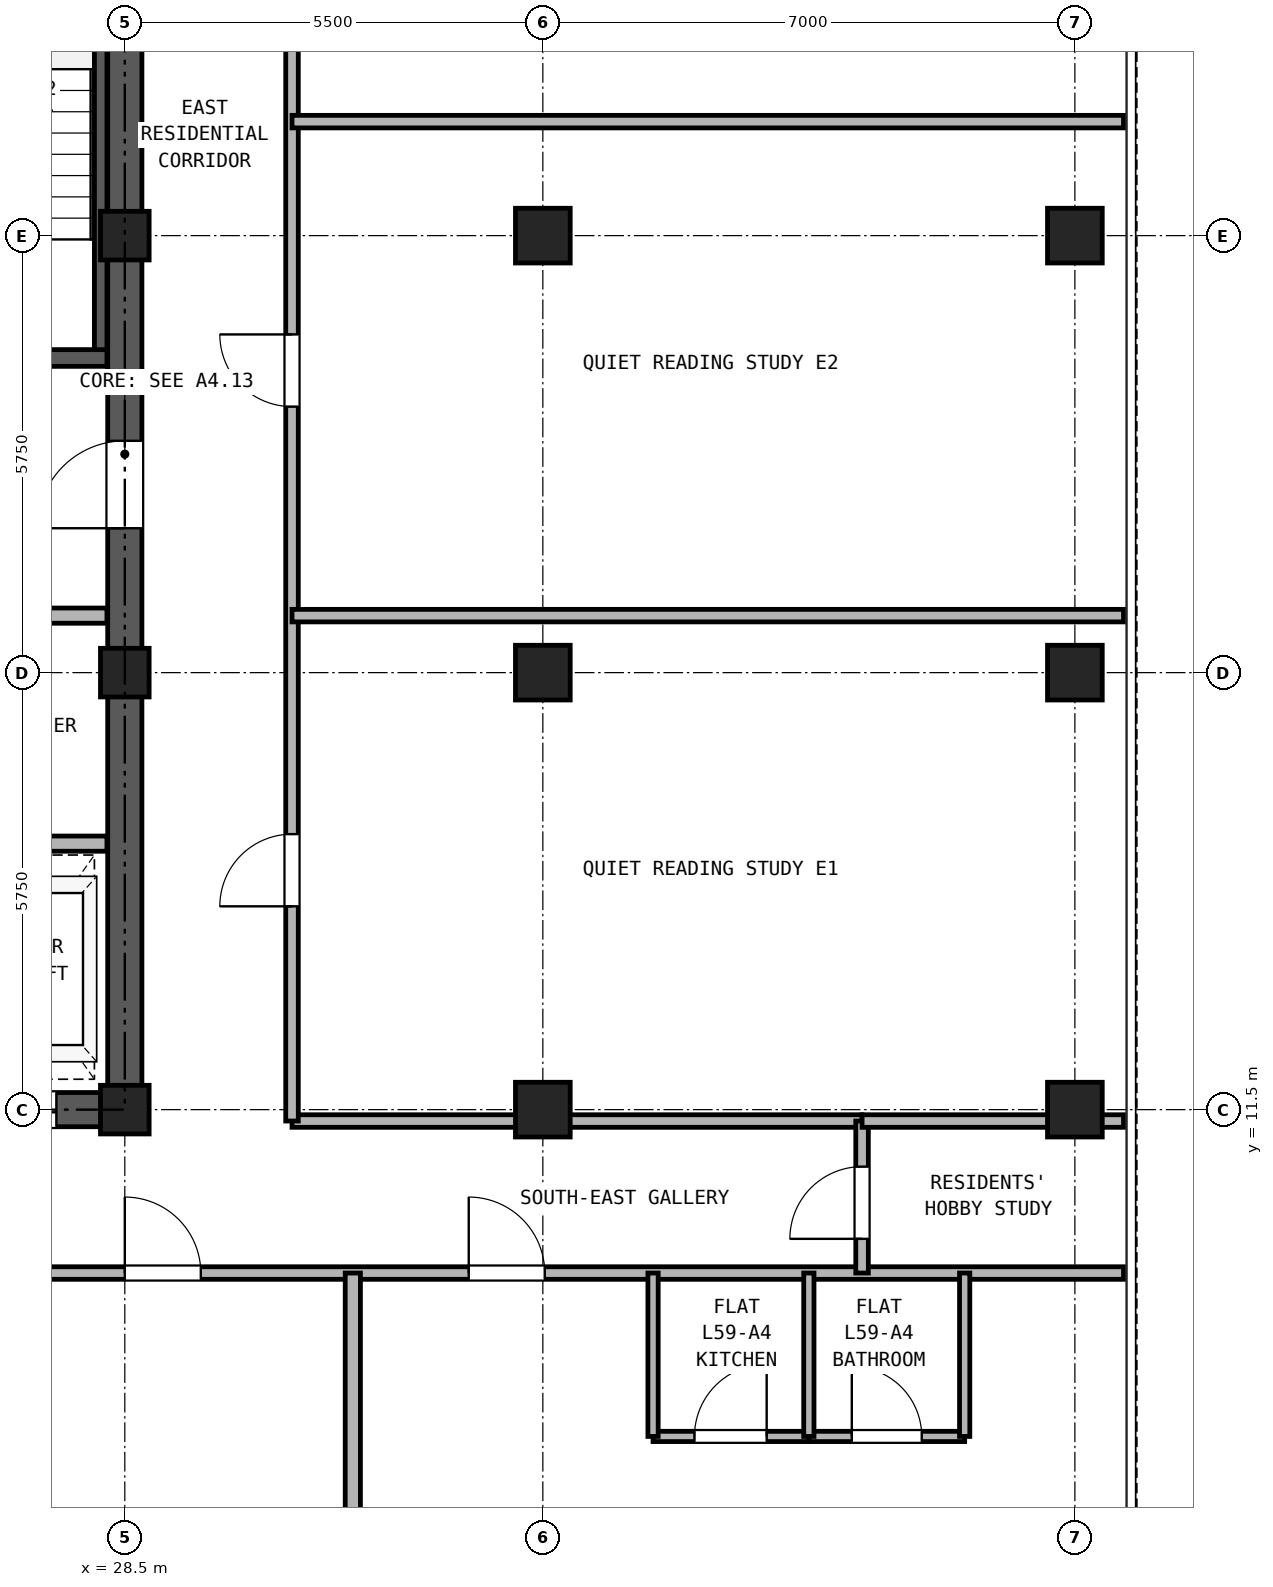
"""IFC4 building model, lengths in metres.
Left out: names, types, materials, properties, quantities, classifications, styles, units other than length and angle.
Written with IfcOpenShell. Run it as: python <this file> out.ifc"""

import sys

from ifc_helpers import new_model, si_unit, direction, frame, frame_2d, origin, origin_2d, place, context, subcontext, project, spatial, rectangle, hollow_rectangle, extrude, source, transform, mapped, element, fill, save


model = new_model("IFC4")
c1 = context("Model", 3, precision=1e-05, world=origin(), true_north=direction((0.0, 1.0)))
c2 = subcontext(c1, "Body", "Model", "MODEL_VIEW")
j1 = project(units=[si_unit("LENGTHUNIT", "METRE"), si_unit("PLANEANGLEUNIT", "RADIAN")], contexts=[c1])
p1 = place(None, origin())
s1 = spatial("IfcSite", under=j1, at=p1, CompositionType="ELEMENT")
p2 = place(p1, origin())
s2 = spatial("IfcBuilding", under=s1, at=p2, CompositionType="ELEMENT")
p3 = place(p2, frame((0.0, 0.0, 209.2)))
s3 = spatial("IfcBuildingStorey", under=s2, at=p3, CompositionType="ELEMENT", Elevation=209.2)
m1 = source(origin(), c2, "Body", "SweptSolid", [
    extrude(hollow_rectangle(XDim=0.72, YDim=0.72, WallThickness=0.04, at=origin_2d()), origin(), (0.0, 0.0, 1.0), 2.95),
])
for number, where, z_axis, x_axis in (
    (1, (41.0, 11.5, 0.0), (0.0, 0.0, 1.0), (1.0, 0.0, 0.0)),
    (2, (41.0, 17.25, 0.0), (0.0, 0.0, 1.0), (1.0, 0.0, 0.0)),
    (3, (41.0, 23.0, 0.0), (0.0, 0.0, 1.0), (1.0, 0.0, 0.0)),
):
    element("IfcColumn", number, at=place(p3, frame(where, z_axis=z_axis, x_axis=x_axis)), inside=s3, PredefinedType="COLUMN", context=c2, shape_type="MappedRepresentation", body=[
        mapped(m1, transform((0.0, 0.0, 0.0), x_axis=(1.0, 0.0, 0.0), y_axis=(0.0, 1.0, 0.0), z_axis=(0.0, 0.0, 1.0), scale=1.0)),
    ])
m2 = source(origin(), c2, "Body", "SweptSolid", [
    extrude(hollow_rectangle(XDim=0.64, YDim=0.64, WallThickness=0.035, at=origin_2d()), origin(), (0.0, 0.0, 1.0), 2.95),
])
for number, where, z_axis, x_axis in (
    (4, (28.5, 11.5, 0.0), (0.0, 0.0, 1.0), (1.0, 0.0, 0.0)),
    (5, (28.5, 17.25, 0.0), (0.0, 0.0, 1.0), (1.0, 0.0, 0.0)),
    (6, (28.5, 23.0, 0.0), (0.0, 0.0, 1.0), (1.0, 0.0, 0.0)),
):
    element("IfcColumn", number, at=place(p3, frame(where, z_axis=z_axis, x_axis=x_axis)), inside=s3, PredefinedType="COLUMN", context=c2, shape_type="MappedRepresentation", body=[
        mapped(m2, transform((0.0, 0.0, 0.0), x_axis=(1.0, 0.0, 0.0), y_axis=(0.0, 1.0, 0.0), z_axis=(0.0, 0.0, 1.0), scale=1.0)),
    ])
for number, where, z_axis, x_axis in (
    (7, (34.0, 11.5, 0.0), (0.0, 0.0, 1.0), (1.0, 0.0, 0.0)),
    (8, (34.0, 17.25, 0.0), (0.0, 0.0, 1.0), (1.0, 0.0, 0.0)),
    (9, (34.0, 23.0, 0.0), (0.0, 0.0, 1.0), (1.0, 0.0, 0.0)),
):
    element("IfcColumn", number, at=place(p3, frame(where, z_axis=z_axis, x_axis=x_axis)), inside=s3, PredefinedType="COLUMN", context=c2, shape_type="MappedRepresentation", body=[
        mapped(m1, transform((0.0, 0.0, 0.0), x_axis=(1.0, 0.0, 0.0), y_axis=(0.0, 1.0, 0.0), z_axis=(0.0, 0.0, 1.0), scale=1.0)),
    ])
p4 = place(p3, frame((18.275, 11.5, 0.0), z_axis=(0.0, 0.0, 1.0), x_axis=(1.0, 0.0, 0.0)))
e10 = element("IfcWall", 10, at=p4, inside=s3, PredefinedType="SHEAR", context=c2, shape_type="SweptSolid", body=[
    extrude(rectangle(XDim=10.45, YDim=0.45, at=frame_2d((5.225, 0.0))), origin(), (0.0, 0.0, 1.0), 2.95),
])
p5 = place(p4, frame((1.825, 0.0, 0.0)))
e11 = element("IfcOpeningElement", 11, at=p5, cuts=e10, PredefinedType="OPENING", context=c2, shape_type="SweptSolid", body=[
    extrude(rectangle(XDim=0.95, YDim=2.15, at=frame_2d((0.475, 1.075))), frame((0.0, 0.235, 0.0), z_axis=(0.0, -1.0, 0.0), x_axis=(1.0, 0.0, 0.0)), (0.0, 0.0, 1.0), 0.47),
])
p6 = place(p4, frame((5.325, 0.0, 0.0)))
e12 = element("IfcOpeningElement", 12, at=p6, cuts=e10, PredefinedType="OPENING", context=c2, shape_type="SweptSolid", body=[
    extrude(rectangle(XDim=0.95, YDim=2.15, at=frame_2d((0.475, 1.075))), frame((0.0, 0.235, 0.0), z_axis=(0.0, -1.0, 0.0), x_axis=(1.0, 0.0, 0.0)), (0.0, 0.0, 1.0), 0.47),
])
p7 = place(p4, frame((8.225, 0.0, 0.0)))
e13 = element("IfcOpeningElement", 13, at=p7, cuts=e10, PredefinedType="OPENING", context=c2, shape_type="SweptSolid", body=[
    extrude(rectangle(XDim=1.1, YDim=2.25, at=frame_2d((0.55, 1.125))), frame((0.0, 0.235, 0.0), z_axis=(0.0, -1.0, 0.0), x_axis=(1.0, 0.0, 0.0)), (0.0, 0.0, 1.0), 0.47),
])
p8 = place(p3, frame((28.5, 11.725, 0.0), z_axis=(0.0, 0.0, 1.0), x_axis=(0.0, 1.0, 0.0)))
e14 = element("IfcWall", 14, at=p8, inside=s3, PredefinedType="SHEAR", context=c2, shape_type="SweptSolid", body=[
    extrude(rectangle(XDim=16.8, YDim=0.45, at=frame_2d((8.4, 0.0))), origin(), (0.0, 0.0, 1.0), 2.95),
])
p9 = place(p8, frame((7.425, 0.0, 0.0)))
e15 = element("IfcOpeningElement", 15, at=p9, cuts=e14, PredefinedType="OPENING", context=c2, shape_type="SweptSolid", body=[
    extrude(rectangle(XDim=1.15, YDim=2.2, at=frame_2d((0.575, 1.1))), frame((0.0, 0.235, 0.0), z_axis=(0.0, -1.0, 0.0), x_axis=(1.0, 0.0, 0.0)), (0.0, 0.0, 1.0), 0.47),
])
p10 = place(p3, frame((28.183, 21.39, 0.0), z_axis=(0.0, 0.0, 1.0), x_axis=(0.0, 1.0, 0.0)))
e16 = element("IfcWall", 16, at=p10, inside=s3, PredefinedType="PARTITIONING", context=c2, shape_type="SweptSolid", body=[
    extrude(rectangle(XDim=6.945, YDim=0.165, at=frame_2d((3.473, 0.0))), origin(), (0.0, 0.0, 1.0), 2.95),
])
p11 = place(p3, frame((25.13, 21.39, 0.0), z_axis=(0.0, 0.0, 1.0), x_axis=(1.0, 0.0, 0.0)))
e17 = element("IfcWall", 17, at=p11, inside=s3, PredefinedType="SOLIDWALL", context=c2, shape_type="SweptSolid", body=[
    extrude(rectangle(XDim=3.135, YDim=0.22, at=frame_2d((1.567, 0.0))), origin(), (0.0, 0.0, 1.0), 2.95),
])
p12 = place(p11, frame((0.92, 0.0, 0.0)))
e18 = element("IfcOpeningElement", 18, at=p12, cuts=e17, PredefinedType="OPENING", context=c2, shape_type="SweptSolid", body=[
    extrude(rectangle(XDim=1.15, YDim=2.2, at=frame_2d((0.575, 1.1))), frame((0.0, 0.12, 0.0), z_axis=(0.0, -1.0, 0.0), x_axis=(1.0, 0.0, 0.0)), (0.0, 0.0, 1.0), 0.24),
])
p13 = place(p3, frame((18.735, 18.0, 0.0), z_axis=(0.0, 0.0, 1.0), x_axis=(1.0, 0.0, 0.0)))
e19 = element("IfcWall", 19, at=p13, inside=s3, PredefinedType="PARTITIONING", context=c2, shape_type="SweptSolid", body=[
    extrude(rectangle(XDim=9.53, YDim=0.2, at=frame_2d((4.765, 0.0))), origin(), (0.0, 0.0, 1.0), 2.95),
])
p14 = place(p13, frame((0.515, 0.0, 0.0)))
e20 = element("IfcOpeningElement", 20, at=p14, cuts=e19, PredefinedType="OPENING", context=c2, shape_type="SweptSolid", body=[
    extrude(rectangle(XDim=1.3, YDim=2.3, at=frame_2d((0.65, 1.15))), frame((0.0, 0.11, 0.0), z_axis=(0.0, -1.0, 0.0), x_axis=(1.0, 0.0, 0.0)), (0.0, 0.0, 1.0), 0.22),
])
p15 = place(p13, frame((2.615, 0.0, 0.0)))
e21 = element("IfcOpeningElement", 21, at=p15, cuts=e19, PredefinedType="OPENING", context=c2, shape_type="SweptSolid", body=[
    extrude(rectangle(XDim=1.3, YDim=2.3, at=frame_2d((0.65, 1.15))), frame((0.0, 0.11, 0.0), z_axis=(0.0, -1.0, 0.0), x_axis=(1.0, 0.0, 0.0)), (0.0, 0.0, 1.0), 0.22),
])
p16 = place(p13, frame((5.015, 0.0, 0.0)))
e22 = element("IfcOpeningElement", 22, at=p16, cuts=e19, PredefinedType="OPENING", context=c2, shape_type="SweptSolid", body=[
    extrude(rectangle(XDim=0.9, YDim=2.05, at=frame_2d((0.45, 1.025))), frame((0.0, 0.11, 0.0), z_axis=(0.0, -1.0, 0.0), x_axis=(1.0, 0.0, 0.0)), (0.0, 0.0, 1.0), 0.22),
])
p17 = place(p13, frame((7.715, 0.0, 0.0)))
e23 = element("IfcOpeningElement", 23, at=p17, cuts=e19, PredefinedType="OPENING", context=c2, shape_type="SweptSolid", body=[
    extrude(rectangle(XDim=0.9, YDim=2.05, at=frame_2d((0.45, 1.025))), frame((0.0, 0.11, 0.0), z_axis=(0.0, -1.0, 0.0), x_axis=(1.0, 0.0, 0.0)), (0.0, 0.0, 1.0), 0.22),
])
p18 = place(p3, frame((18.735, 15.0, 0.0), z_axis=(0.0, 0.0, 1.0), x_axis=(1.0, 0.0, 0.0)))
e24 = element("IfcWall", 24, at=p18, inside=s3, PredefinedType="PARTITIONING", context=c2, shape_type="SweptSolid", body=[
    extrude(rectangle(XDim=9.53, YDim=0.2, at=frame_2d((4.765, 0.0))), origin(), (0.0, 0.0, 1.0), 2.95),
])
p19 = place(p3, frame((0.16, 9.35, 0.0), z_axis=(0.0, 0.0, 1.0), x_axis=(1.0, 0.0, 0.0)))
e25 = element("IfcWall", 25, at=p19, inside=s3, PredefinedType="PARTITIONING", context=c2, shape_type="SweptSolid", body=[
    extrude(rectangle(XDim=41.48, YDim=0.165, at=frame_2d((20.74, 0.0))), origin(), (0.0, 0.0, 1.0), 2.95),
])
p20 = place(p19, frame((9.64, 0.0, 0.0)))
e26 = element("IfcOpeningElement", 26, at=p20, cuts=e25, PredefinedType="OPENING", context=c2, shape_type="SweptSolid", body=[
    extrude(rectangle(XDim=1.0, YDim=2.15, at=frame_2d((0.5, 1.075))), frame((0.0, 0.093, 0.0), z_axis=(0.0, -1.0, 0.0), x_axis=(1.0, 0.0, 0.0)), (0.0, 0.0, 1.0), 0.185),
])
p21 = place(p19, frame((19.09, 0.0, 0.0)))
e27 = element("IfcOpeningElement", 27, at=p21, cuts=e25, PredefinedType="OPENING", context=c2, shape_type="SweptSolid", body=[
    extrude(rectangle(XDim=1.0, YDim=2.15, at=frame_2d((0.5, 1.075))), frame((0.0, 0.093, 0.0), z_axis=(0.0, -1.0, 0.0), x_axis=(1.0, 0.0, 0.0)), (0.0, 0.0, 1.0), 0.185),
])
p22 = place(p19, frame((28.34, 0.0, 0.0)))
e28 = element("IfcOpeningElement", 28, at=p22, cuts=e25, PredefinedType="OPENING", context=c2, shape_type="SweptSolid", body=[
    extrude(rectangle(XDim=1.0, YDim=2.15, at=frame_2d((0.5, 1.075))), frame((0.0, 0.093, 0.0), z_axis=(0.0, -1.0, 0.0), x_axis=(1.0, 0.0, 0.0)), (0.0, 0.0, 1.0), 0.185),
])
p23 = place(p19, frame((32.865, 0.0, 0.0)))
e29 = element("IfcOpeningElement", 29, at=p23, cuts=e25, PredefinedType="OPENING", context=c2, shape_type="SweptSolid", body=[
    extrude(rectangle(XDim=1.0, YDim=2.15, at=frame_2d((0.5, 1.075))), frame((0.0, 0.093, 0.0), z_axis=(0.0, -1.0, 0.0), x_axis=(1.0, 0.0, 0.0)), (0.0, 0.0, 1.0), 0.185),
])
p24 = place(p3, frame((30.7, 11.35, 0.0), z_axis=(0.0, 0.0, 1.0), x_axis=(1.0, 0.0, 0.0)))
e30 = element("IfcWall", 30, at=p24, inside=s3, PredefinedType="PARTITIONING", context=c2, shape_type="SweptSolid", body=[
    extrude(rectangle(XDim=7.5, YDim=0.165, at=frame_2d((3.75, 0.0))), origin(), (0.0, 0.0, 1.0), 2.323),
])
p25 = place(p3, frame((38.2, 9.35, 0.0), z_axis=(0.0, 0.0, 1.0), x_axis=(0.0, 1.0, 0.0)))
e31 = element("IfcWall", 31, at=p25, inside=s3, PredefinedType="PARTITIONING", context=c2, shape_type="SweptSolid", body=[
    extrude(rectangle(XDim=2.0, YDim=0.165, at=frame_2d((1.0, 0.0))), origin(), (0.0, 0.0, 1.0), 2.95),
])
p26 = place(p25, frame((0.45, 0.0, 0.0)))
e32 = element("IfcOpeningElement", 32, at=p26, cuts=e31, PredefinedType="OPENING", context=c2, shape_type="SweptSolid", body=[
    extrude(rectangle(XDim=0.95, YDim=2.15, at=frame_2d((0.475, 1.075))), frame((0.0, 0.093, 0.0), z_axis=(0.0, -1.0, 0.0), x_axis=(1.0, 0.0, 0.0)), (0.0, 0.0, 1.0), 0.185),
])
p27 = place(p3, frame((30.7, 11.35, 0.0), z_axis=(0.0, 0.0, 1.0), x_axis=(0.0, 1.0, 0.0)))
e33 = element("IfcWall", 33, at=p27, inside=s3, PredefinedType="PARTITIONING", context=c2, shape_type="SweptSolid", body=[
    extrude(rectangle(XDim=23.79, YDim=0.165, at=frame_2d((11.895, 0.0))), origin(), (0.0, 0.0, 1.0), 2.95),
])
p28 = place(p27, frame((2.825, 0.0, 0.0)))
e34 = element("IfcOpeningElement", 34, at=p28, cuts=e33, PredefinedType="OPENING", context=c2, shape_type="SweptSolid", body=[
    extrude(rectangle(XDim=0.95, YDim=2.15, at=frame_2d((0.475, 1.075))), frame((0.0, 0.093, 0.0), z_axis=(0.0, -1.0, 0.0), x_axis=(1.0, 0.0, 0.0)), (0.0, 0.0, 1.0), 0.185),
])
p29 = place(p27, frame((9.4, 0.0, 0.0)))
e35 = element("IfcOpeningElement", 35, at=p29, cuts=e33, PredefinedType="OPENING", context=c2, shape_type="SweptSolid", body=[
    extrude(rectangle(XDim=0.95, YDim=2.15, at=frame_2d((0.475, 1.075))), frame((0.0, 0.093, 0.0), z_axis=(0.0, -1.0, 0.0), x_axis=(1.0, 0.0, 0.0)), (0.0, 0.0, 1.0), 0.185),
])
p30 = place(p27, frame((15.5, 0.0, 0.0)))
e36 = element("IfcOpeningElement", 36, at=p30, cuts=e33, PredefinedType="OPENING", context=c2, shape_type="SweptSolid", body=[
    extrude(rectangle(XDim=0.95, YDim=2.15, at=frame_2d((0.475, 1.075))), frame((0.0, 0.093, 0.0), z_axis=(0.0, -1.0, 0.0), x_axis=(1.0, 0.0, 0.0)), (0.0, 0.0, 1.0), 0.185),
])
p31 = place(p27, frame((20.82, 0.0, 0.0)))
e37 = element("IfcOpeningElement", 37, at=p31, cuts=e33, PredefinedType="OPENING", context=c2, shape_type="SweptSolid", body=[
    extrude(rectangle(XDim=0.95, YDim=2.15, at=frame_2d((0.475, 1.075))), frame((0.0, 0.093, 0.0), z_axis=(0.0, -1.0, 0.0), x_axis=(1.0, 0.0, 0.0)), (0.0, 0.0, 1.0), 0.185),
])
p32 = place(p3, frame((31.5, 0.16, 0.0), z_axis=(0.0, 0.0, 1.0), x_axis=(0.0, 1.0, 0.0)))
e38 = element("IfcWall", 38, at=p32, inside=s3, PredefinedType="PARTITIONING", context=c2, shape_type="SweptSolid", body=[
    extrude(rectangle(XDim=9.19, YDim=0.2, at=frame_2d((4.595, 0.0))), origin(), (0.0, 0.0, 1.0), 2.95),
])
p33 = place(p3, frame((35.45, 7.2, 0.0), z_axis=(0.0, 0.0, 1.0), x_axis=(1.0, 0.0, 0.0)))
e39 = element("IfcWall", 39, at=p33, inside=s3, PredefinedType="PARTITIONING", context=c2, shape_type="SweptSolid", body=[
    extrude(rectangle(XDim=2.05, YDim=0.135, at=frame_2d((1.025, 0.0))), origin(), (0.0, 0.0, 1.0), 2.95),
])
p34 = place(p33, frame((0.545, 0.0, 0.0)))
e40 = element("IfcOpeningElement", 40, at=p34, cuts=e39, PredefinedType="OPENING", context=c2, shape_type="SweptSolid", body=[
    extrude(rectangle(XDim=0.95, YDim=2.15, at=frame_2d((0.475, 1.075))), frame((0.0, 0.077, 0.0), z_axis=(0.0, -1.0, 0.0), x_axis=(1.0, 0.0, 0.0)), (0.0, 0.0, 1.0), 0.155),
])
p35 = place(p3, frame((37.5, 7.2, 0.0), z_axis=(0.0, 0.0, 1.0), x_axis=(1.0, 0.0, 0.0)))
e41 = element("IfcWall", 41, at=p35, inside=s3, PredefinedType="PARTITIONING", context=c2, shape_type="SweptSolid", body=[
    extrude(rectangle(XDim=2.05, YDim=0.135, at=frame_2d((1.025, 0.0))), origin(), (0.0, 0.0, 1.0), 2.95),
])
p36 = place(p35, frame((0.565, 0.0, 0.0)))
e42 = element("IfcOpeningElement", 42, at=p36, cuts=e41, PredefinedType="OPENING", context=c2, shape_type="SweptSolid", body=[
    extrude(rectangle(XDim=0.92, YDim=2.1, at=frame_2d((0.46, 1.05))), frame((0.0, 0.077, 0.0), z_axis=(0.0, -1.0, 0.0), x_axis=(1.0, 0.0, 0.0)), (0.0, 0.0, 1.0), 0.155),
])
for number, where, z_axis, x_axis in (
    (43, (35.45, 7.2, 0.0), (0.0, 0.0, 1.0), (0.0, 1.0, 0.0)),
    (44, (37.5, 7.2, 0.0), (0.0, 0.0, 1.0), (0.0, 1.0, 0.0)),
    (45, (39.55, 7.2, 0.0), (0.0, 0.0, 1.0), (0.0, 1.0, 0.0)),
):
    element("IfcWall", number, at=place(p3, frame(where, z_axis=z_axis, x_axis=x_axis)), inside=s3, PredefinedType="PARTITIONING", context=c2, shape_type="SweptSolid", body=[
        extrude(rectangle(XDim=2.15, YDim=0.135, at=frame_2d((1.075, 0.0))), origin(), (0.0, 0.0, 1.0), 2.95),
    ])
p37 = place(p3, frame((38.2, 11.35, 0.0), z_axis=(0.0, 0.0, 1.0), x_axis=(1.0, 0.0, 0.0)))
e46 = element("IfcWall", 46, at=p37, inside=s3, PredefinedType="PARTITIONING", context=c2, shape_type="SweptSolid", body=[
    extrude(rectangle(XDim=3.44, YDim=0.165, at=frame_2d((1.72, 0.0))), origin(), (0.0, 0.0, 1.0), 2.323),
])
for number, where, z_axis, x_axis in (
    (47, (30.7, 18.0, 0.0), (0.0, 0.0, 1.0), (1.0, 0.0, 0.0)),
    (48, (30.7, 24.5, 0.0), (0.0, 0.0, 1.0), (1.0, 0.0, 0.0)),
):
    element("IfcWall", number, at=place(p3, frame(where, z_axis=z_axis, x_axis=x_axis)), inside=s3, PredefinedType="PARTITIONING", context=c2, shape_type="SweptSolid", body=[
        extrude(rectangle(XDim=10.94, YDim=0.165, at=frame_2d((5.47, 0.0))), origin(), (0.0, 0.0, 1.0), 2.95),
    ])
p38 = place(p9, origin())
e49 = element("IfcDoor", 49, at=p38, inside=s3, OperationType="SINGLE_SWING_LEFT", PredefinedType="DOOR", context=c2, shape_type="SweptSolid", body=[
    extrude(rectangle(XDim=1.15, YDim=2.2, at=frame_2d((0.575, 1.1))), frame((0.0, 0.025, 0.0), z_axis=(0.0, -1.0, 0.0), x_axis=(1.0, 0.0, 0.0)), (0.0, 0.0, 1.0), 0.05),
])
fill(e15, e49)
p39 = place(p7, frame((1.1, 0.0, 0.0), z_axis=(0.0, 0.0, 1.0), x_axis=(-1.0, 0.0, 0.0)))
e50 = element("IfcDoor", 50, at=p39, inside=s3, OperationType="DOUBLE_DOOR_SLIDING", PredefinedType="DOOR", context=c2, shape_type="SweptSolid", body=[
    extrude(rectangle(XDim=1.1, YDim=2.25, at=frame_2d((0.55, 1.125))), frame((0.0, 0.025, 0.0), z_axis=(0.0, -1.0, 0.0), x_axis=(1.0, 0.0, 0.0)), (0.0, 0.0, 1.0), 0.05),
])
fill(e13, e50)
p40 = place(p22, frame((1.0, 0.0, 0.0), z_axis=(0.0, 0.0, 1.0), x_axis=(-1.0, 0.0, 0.0)))
e51 = element("IfcDoor", 51, at=p40, inside=s3, OperationType="SINGLE_SWING_LEFT", PredefinedType="DOOR", context=c2, shape_type="SweptSolid", body=[
    extrude(rectangle(XDim=1.0, YDim=2.15, at=frame_2d((0.5, 1.075))), frame((0.0, 0.025, 0.0), z_axis=(0.0, -1.0, 0.0), x_axis=(1.0, 0.0, 0.0)), (0.0, 0.0, 1.0), 0.05),
])
fill(e28, e51)
p41 = place(p34, origin())
e52 = element("IfcDoor", 52, at=p41, inside=s3, OperationType="SINGLE_SWING_RIGHT", PredefinedType="DOOR", context=c2, shape_type="SweptSolid", body=[
    extrude(rectangle(XDim=0.95, YDim=2.15, at=frame_2d((0.475, 1.075))), frame((0.0, 0.025, 0.0), z_axis=(0.0, -1.0, 0.0), x_axis=(1.0, 0.0, 0.0)), (0.0, 0.0, 1.0), 0.05),
])
fill(e40, e52)
p42 = place(p36, origin())
e53 = element("IfcDoor", 53, at=p42, inside=s3, OperationType="SINGLE_SWING_LEFT", PredefinedType="DOOR", context=c2, shape_type="SweptSolid", body=[
    extrude(rectangle(XDim=0.92, YDim=2.1, at=frame_2d((0.46, 1.05))), frame((0.0, 0.025, 0.0), z_axis=(0.0, -1.0, 0.0), x_axis=(1.0, 0.0, 0.0)), (0.0, 0.0, 1.0), 0.05),
])
fill(e42, e53)
p43 = place(p23, frame((1.0, 0.0, 0.0), z_axis=(0.0, 0.0, 1.0), x_axis=(-1.0, 0.0, 0.0)))
e54 = element("IfcDoor", 54, at=p43, inside=s3, OperationType="SINGLE_SWING_LEFT", PredefinedType="DOOR", context=c2, shape_type="SweptSolid", body=[
    extrude(rectangle(XDim=1.0, YDim=2.15, at=frame_2d((0.5, 1.075))), frame((0.0, 0.025, 0.0), z_axis=(0.0, -1.0, 0.0), x_axis=(1.0, 0.0, 0.0)), (0.0, 0.0, 1.0), 0.05),
])
fill(e29, e54)
p44 = place(p26, origin())
e55 = element("IfcDoor", 55, at=p44, inside=s3, OperationType="SINGLE_SWING_LEFT", PredefinedType="DOOR", context=c2, shape_type="SweptSolid", body=[
    extrude(rectangle(XDim=0.95, YDim=2.15, at=frame_2d((0.475, 1.075))), frame((0.0, 0.025, 0.0), z_axis=(0.0, -1.0, 0.0), x_axis=(1.0, 0.0, 0.0)), (0.0, 0.0, 1.0), 0.05),
])
fill(e32, e55)
p45 = place(p28, origin())
e56 = element("IfcDoor", 56, at=p45, inside=s3, OperationType="SINGLE_SWING_LEFT", PredefinedType="DOOR", context=c2, shape_type="SweptSolid", body=[
    extrude(rectangle(XDim=0.95, YDim=2.15, at=frame_2d((0.475, 1.075))), frame((0.0, 0.025, 0.0), z_axis=(0.0, -1.0, 0.0), x_axis=(1.0, 0.0, 0.0)), (0.0, 0.0, 1.0), 0.05),
])
fill(e34, e56)
p46 = place(p29, origin())
e57 = element("IfcDoor", 57, at=p46, inside=s3, OperationType="SINGLE_SWING_RIGHT", PredefinedType="DOOR", context=c2, shape_type="SweptSolid", body=[
    extrude(rectangle(XDim=0.95, YDim=2.15, at=frame_2d((0.475, 1.075))), frame((0.0, 0.025, 0.0), z_axis=(0.0, -1.0, 0.0), x_axis=(1.0, 0.0, 0.0)), (0.0, 0.0, 1.0), 0.05),
])
fill(e35, e57)
save(model, sys.argv[1])
